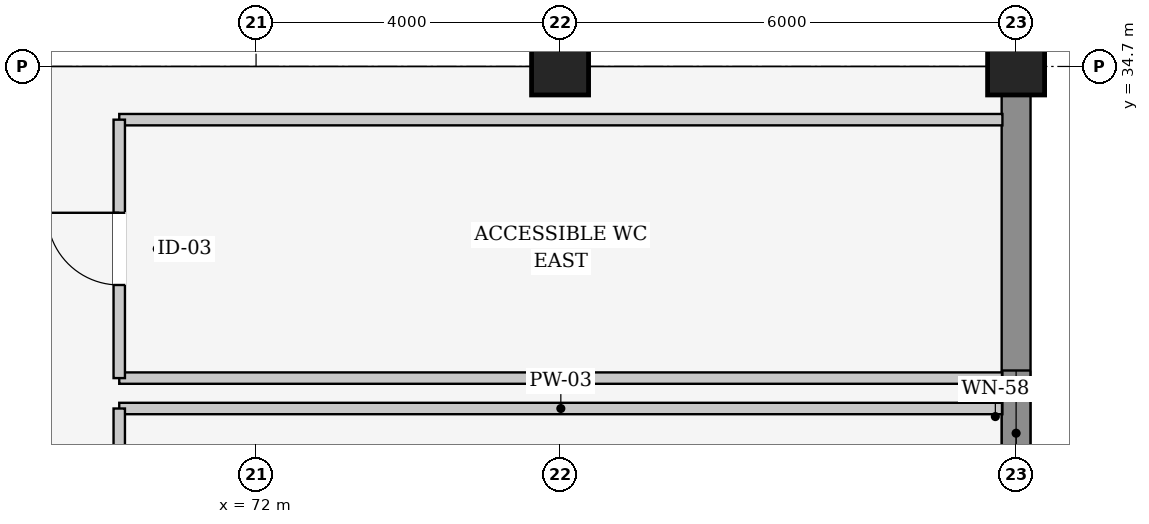
"""IFC4 building model, lengths in metres.
Left out: names, types, materials, properties, quantities, classifications, styles, units other than length and angle.
Written with IfcOpenShell. Run it as: python <this file> out.ifc"""

import sys

from ifc_helpers import new_model, si_unit, direction, frame, frame_2d, origin, origin_2d, place, context, subcontext, project, spatial, rectangle, extrude, element, fill, save


model = new_model("IFC4")
c1 = context("Model", 3, precision=1e-05, world=origin(), true_north=direction((0.0, 1.0)))
c2 = subcontext(c1, "Body", "Model", "MODEL_VIEW")
j1 = project(units=[si_unit("LENGTHUNIT", "METRE"), si_unit("PLANEANGLEUNIT", "RADIAN")], contexts=[c1])
p1 = place(None, origin())
s1 = spatial("IfcSite", under=j1, at=p1, CompositionType="ELEMENT")
p2 = place(p1, origin())
s2 = spatial("IfcBuilding", under=s1, at=p2, CompositionType="ELEMENT")
p3 = place(p2, frame((0.0, 0.0, 16.2)))
s3 = spatial("IfcBuildingStorey", under=s2, at=p3, CompositionType="ELEMENT", Elevation=16.2)
for number, where, z_axis, x_axis in (
    (1, (76.0, 34.7, 0.0), (0.0, 0.0, 1.0), (1.0, 0.0, 0.0)),
    (2, (82.0, 34.7, 0.0), (0.0, 0.0, 1.0), (1.0, 0.0, 0.0)),
):
    element("IfcColumn", number, at=place(p3, frame(where, z_axis=z_axis, x_axis=x_axis)), inside=s3, PredefinedType="COLUMN", context=c2, shape_type="SweptSolid", body=[
        extrude(rectangle(XDim=0.75, YDim=0.75, at=origin_2d()), origin(), (0.0, 0.0, 1.0), 4.8),
    ])
p4 = place(p3, frame((82.0, 34.343, 0.0), z_axis=(0.0, 0.0, 1.0), x_axis=(0.0, -1.0, 0.0)))
e3 = element("IfcWall", 3, at=p4, inside=s3, PredefinedType="SOLIDWALL", context=c2, shape_type="SweptSolid", body=[
    extrude(rectangle(XDim=8.936, YDim=0.38, at=frame_2d((4.468, 0.0))), origin(), (0.0, 0.0, 1.0), 3.76),
])
p5 = place(p4, frame((3.643, 0.0, 0.9)))
e4 = element("IfcOpeningElement", 4, at=p5, cuts=e3, PredefinedType="OPENING", context=c2, shape_type="SweptSolid", body=[
    extrude(rectangle(XDim=1.65, YDim=2.8, at=frame_2d((0.825, 1.4))), frame((0.0, 0.2, 0.0), z_axis=(0.0, -1.0, 0.0), x_axis=(1.0, 0.0, 0.0)), (0.0, 0.0, 1.0), 0.4),
])
p6 = place(p3, frame((70.2, 30.2, 0.0), z_axis=(0.0, 0.0, 1.0), x_axis=(1.0, 0.0, 0.0)))
e5 = element("IfcWall", 5, at=p6, inside=s3, PredefinedType="PARTITIONING", context=c2, shape_type="SweptSolid", body=[
    extrude(rectangle(XDim=11.62, YDim=0.15, at=frame_2d((5.81, 0.0))), origin(), (0.0, 0.0, 1.0), 3.962),
])
p7 = place(p3, frame((70.2, 25.2, 0.0), z_axis=(0.0, 0.0, 1.0), x_axis=(0.0, 1.0, 0.0)))
e6 = element("IfcWall", 6, at=p7, inside=s3, PredefinedType="PARTITIONING", context=c2, shape_type="SweptSolid", body=[
    extrude(rectangle(XDim=5.0, YDim=0.15, at=frame_2d((2.5, 0.0))), origin(), (0.0, 0.0, 1.0), 3.545),
])
p8 = place(p7, frame((2.025, 0.0, 0.0)))
e7 = element("IfcOpeningElement", 7, at=p8, cuts=e6, PredefinedType="OPENING", context=c2, shape_type="SweptSolid", body=[
    extrude(rectangle(XDim=0.95, YDim=2.15, at=frame_2d((0.475, 1.075))), frame((0.0, 0.085, 0.0), z_axis=(0.0, -1.0, 0.0), x_axis=(1.0, 0.0, 0.0)), (0.0, 0.0, 1.0), 0.17),
])
for number, where, z_axis, x_axis in (
    (8, (70.2, 34.0, 0.0), (0.0, 0.0, 1.0), (1.0, 0.0, 0.0)),
    (9, (81.82, 30.6, 0.0), (0.0, 0.0, 1.0), (-1.0, 0.0, 0.0)),
):
    element("IfcWall", number, at=place(p3, frame(where, z_axis=z_axis, x_axis=x_axis)), inside=s3, PredefinedType="PARTITIONING", context=c2, shape_type="SweptSolid", body=[
        extrude(rectangle(XDim=11.62, YDim=0.15, at=frame_2d((5.81, 0.0))), origin(), (0.0, 0.0, 1.0), 3.962),
    ])
p9 = place(p3, frame((70.2, 30.6, 0.0), z_axis=(0.0, 0.0, 1.0), x_axis=(0.0, 1.0, 0.0)))
e10 = element("IfcWall", 10, at=p9, inside=s3, PredefinedType="PARTITIONING", context=c2, shape_type="SweptSolid", body=[
    extrude(rectangle(XDim=3.4, YDim=0.15, at=frame_2d((1.7, 0.0))), origin(), (0.0, 0.0, 1.0), 4.44),
])
p10 = place(p9, frame((1.225, 0.0, 0.0)))
e11 = element("IfcOpeningElement", 11, at=p10, cuts=e10, PredefinedType="OPENING", context=c2, shape_type="SweptSolid", body=[
    extrude(rectangle(XDim=0.95, YDim=2.15, at=frame_2d((0.475, 1.075))), frame((0.0, 0.085, 0.0), z_axis=(0.0, -1.0, 0.0), x_axis=(1.0, 0.0, 0.0)), (0.0, 0.0, 1.0), 0.17),
])
p11 = place(p5, origin())
e12 = element("IfcWindow", 12, at=p11, inside=s3, PartitioningType="SINGLE_PANEL", PredefinedType="WINDOW", context=c2, shape_type="SweptSolid", body=[
    extrude(rectangle(XDim=1.65, YDim=2.8, at=frame_2d((0.825, 1.4))), frame((0.0, 0.03, 0.0), z_axis=(0.0, -1.0, 0.0), x_axis=(1.0, 0.0, 0.0)), (0.0, 0.0, 1.0), 0.06),
])
fill(e4, e12)
p12 = place(p10, origin())
e13 = element("IfcDoor", 13, at=p12, inside=s3, OperationType="SINGLE_SWING_RIGHT", PredefinedType="DOOR", context=c2, shape_type="SweptSolid", body=[
    extrude(rectangle(XDim=0.95, YDim=2.15, at=frame_2d((0.475, 1.075))), frame((0.0, 0.025, 0.0), z_axis=(0.0, -1.0, 0.0), x_axis=(1.0, 0.0, 0.0)), (0.0, 0.0, 1.0), 0.05),
])
fill(e11, e13)
save(model, sys.argv[1])
